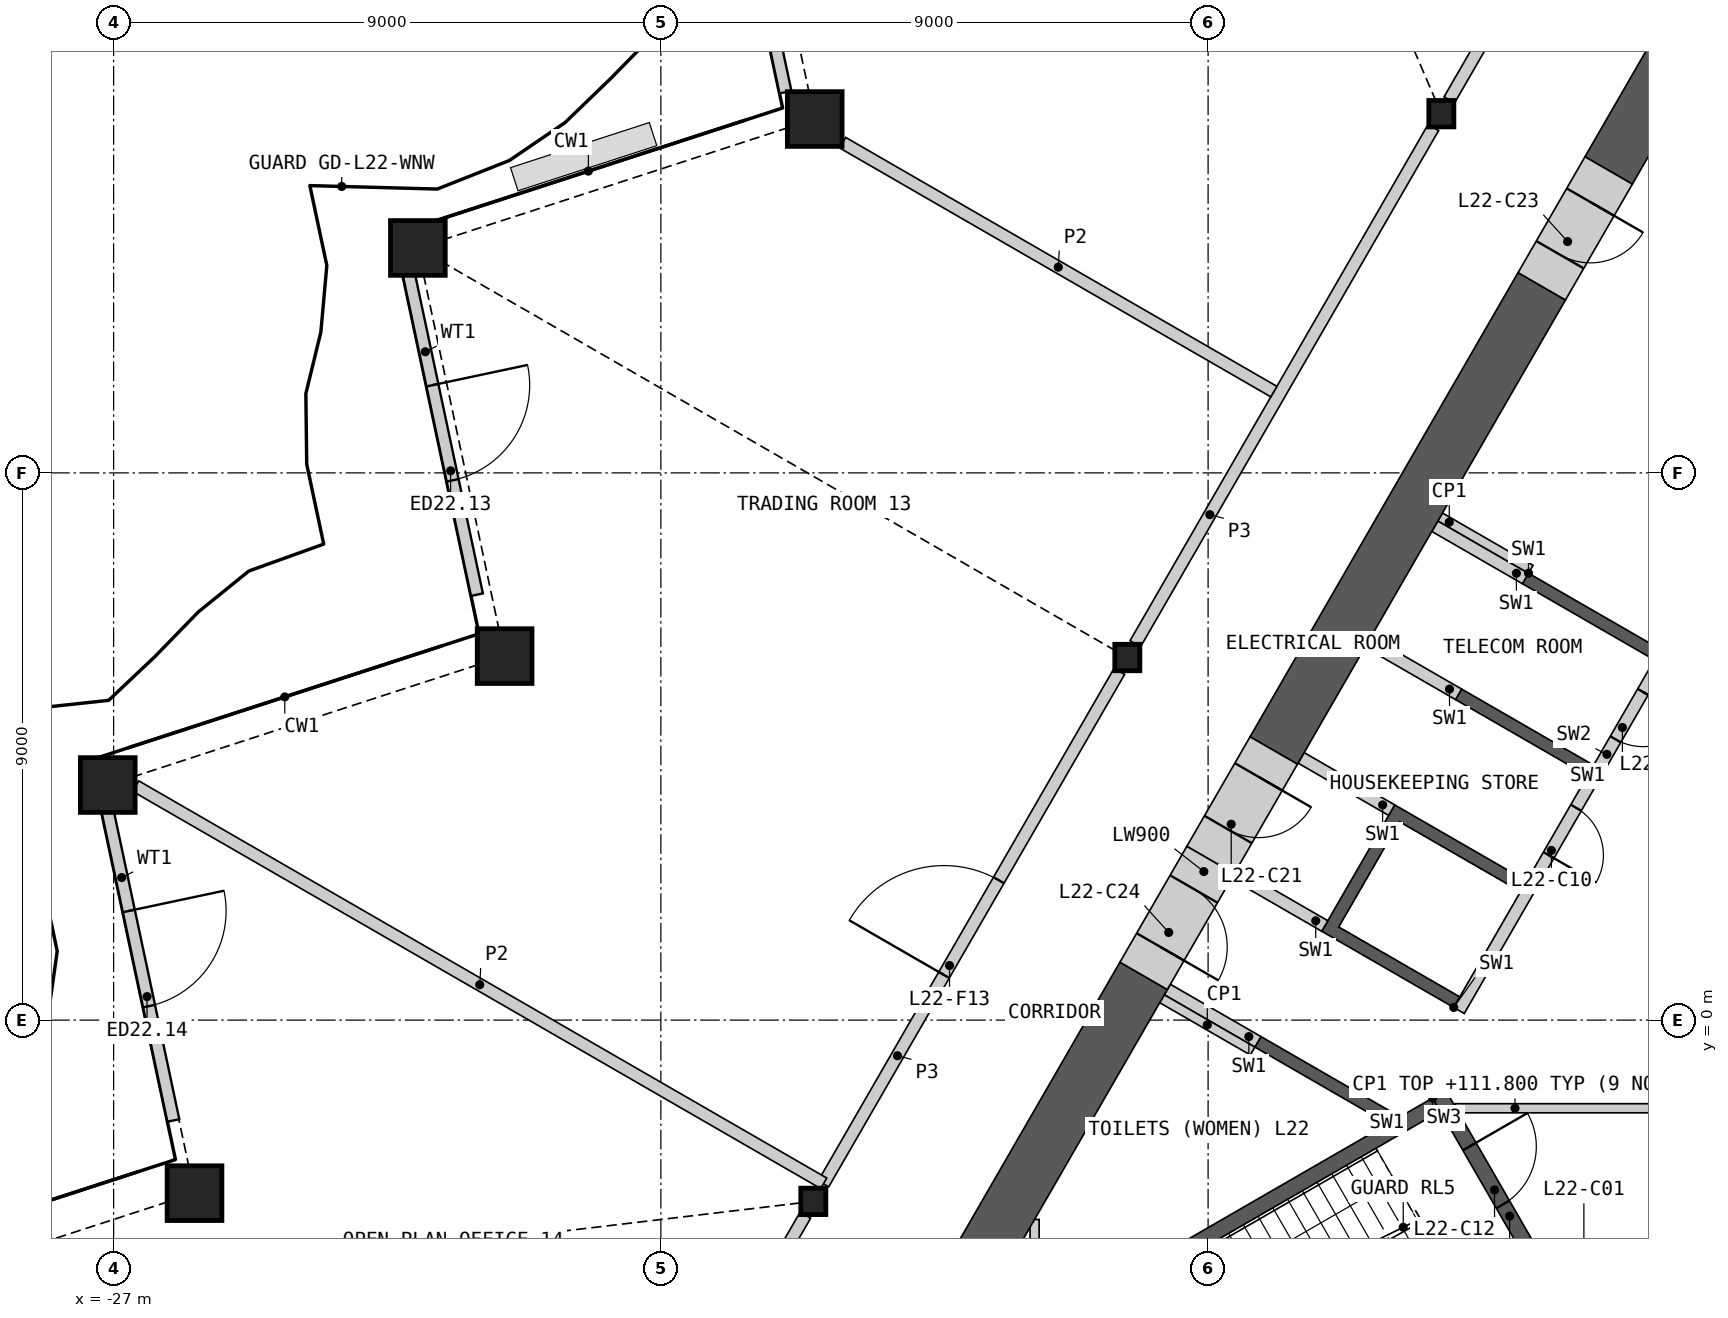
"""IFC4 building model, lengths in metres.
Left out: names, types, materials, properties, quantities, classifications, styles, units other than length and angle.
Written with IfcOpenShell. Run it as: python <this file> out.ifc"""

import sys

from ifc_helpers import new_model, si_unit, direction, frame, frame_2d, origin, origin_2d, place, context, subcontext, project, spatial, polyline, rectangle, hollow_rectangle, i_section, outline, extrude, element, fill, save


model = new_model("IFC4")
c1 = context("Model", 3, precision=1e-05, world=origin(), true_north=direction((0.0, 1.0)))
c2 = subcontext(c1, "Body", "Model", "MODEL_VIEW")
j1 = project(units=[si_unit("LENGTHUNIT", "METRE"), si_unit("PLANEANGLEUNIT", "RADIAN")], contexts=[c1])
p1 = place(None, origin())
s1 = spatial("IfcSite", under=j1, at=p1, CompositionType="ELEMENT")
p2 = place(p1, origin())
s2 = spatial("IfcBuilding", under=s1, at=p2, CompositionType="ELEMENT")
p3 = place(p2, frame((0.0, 0.0, 108.0)))
s3 = spatial("IfcBuildingStorey", under=s2, at=p3, CompositionType="ELEMENT", Elevation=108.0)
for number, where, z_axis, x_axis in (
    (1, (-15.469, 14.82, 0.0), (0.0, 0.0, 1.0), (1.0, 0.0, 0.0)),
    (2, (-21.996, 12.699, 0.0), (0.0, 0.0, 1.0), (1.0, 0.0, 0.0)),
    (3, (-20.57, 5.987, 0.0), (0.0, 0.0, 1.0), (1.0, 0.0, 0.0)),
    (4, (-27.096, 3.866, 0.0), (0.0, 0.0, 1.0), (1.0, 0.0, 0.0)),
    (5, (-25.669, -2.846, 0.0), (0.0, 0.0, 1.0), (1.0, 0.0, 0.0)),
):
    element("IfcColumn", number, at=place(p3, frame(where, z_axis=z_axis, x_axis=x_axis)), inside=s3, PredefinedType="COLUMN", context=c2, shape_type="SweptSolid", body=[
        extrude(hollow_rectangle(XDim=0.9, YDim=0.9, WallThickness=0.06, at=origin_2d()), origin(), (0.0, 0.0, 1.0), 4.2),
    ])
for number, where, z_axis, x_axis in (
    (6, (-5.164, 14.908, 0.0), (0.0, 0.0, 1.0), (1.0, 0.0, 0.0)),
    (7, (-10.328, 5.963, 0.0), (0.0, 0.0, 1.0), (1.0, 0.0, 0.0)),
    (8, (-15.493, -2.982, 0.0), (0.0, 0.0, 1.0), (1.0, 0.0, 0.0)),
):
    element("IfcColumn", number, at=place(p3, frame(where, z_axis=z_axis, x_axis=x_axis)), inside=s3, PredefinedType="COLUMN", context=c2, shape_type="SweptSolid", body=[
        extrude(i_section(OverallWidth=0.412, OverallDepth=0.435, WebThickness=0.036, FlangeThickness=0.057, at=origin_2d()), origin(), (0.0, 0.0, 1.0), 4.2),
    ])
p4 = place(p3, frame((-17.185, 21.066, 0.0), z_axis=(0.0, 0.0, 1.0), x_axis=(0.207930102794, -0.978143686966, 0.0)))
e9 = element("IfcWall", 9, at=p4, inside=s3, PredefinedType="SOLIDWALL", context=c2, shape_type="SweptSolid", body=[
    extrude(rectangle(XDim=5.934, YDim=0.2, at=frame_2d((2.967, 0.0))), origin(), (0.0, 0.0, 1.0), 3.189),
])
p5 = place(p4, frame((2.02, 0.0, 0.0)))
e10 = element("IfcOpeningElement", 10, at=p5, cuts=e9, PredefinedType="OPENING", context=c2, shape_type="SweptSolid", body=[
    extrude(rectangle(XDim=1.6, YDim=2.4, at=frame_2d((0.8, 1.2))), frame((0.0, 0.11, 0.0), z_axis=(0.0, -1.0, 0.0), x_axis=(1.0, 0.0, 0.0)), (0.0, 0.0, 1.0), 0.22),
])
p6 = place(p3, frame((-22.157, 12.324, 0.0), z_axis=(0.0, 0.0, 1.0), x_axis=(0.207903253291, -0.978149394148, 0.0)))
e11 = element("IfcWall", 11, at=p6, inside=s3, PredefinedType="SOLIDWALL", context=c2, shape_type="SweptSolid", body=[
    extrude(rectangle(XDim=5.446, YDim=0.2, at=frame_2d((2.723, 0.0))), origin(), (0.0, 0.0, 1.0), 3.189),
])
p7 = place(p6, frame((1.923, 0.0, 0.0)))
e12 = element("IfcOpeningElement", 12, at=p7, cuts=e11, PredefinedType="OPENING", context=c2, shape_type="SweptSolid", body=[
    extrude(rectangle(XDim=1.6, YDim=2.4, at=frame_2d((0.8, 1.2))), frame((0.0, 0.11, 0.0), z_axis=(0.0, -1.0, 0.0), x_axis=(1.0, 0.0, 0.0)), (0.0, 0.0, 1.0), 0.22),
])
p8 = place(p3, frame((-27.15, 3.676, 0.0), z_axis=(0.0, 0.0, 1.0), x_axis=(0.207912369528, -0.978147456469, 0.0)))
e13 = element("IfcWall", 13, at=p8, inside=s3, PredefinedType="SOLIDWALL", context=c2, shape_type="SweptSolid", body=[
    extrude(rectangle(XDim=5.446, YDim=0.2, at=frame_2d((2.723, 0.0))), origin(), (0.0, 0.0, 1.0), 3.189),
])
p9 = place(p8, frame((1.923, 0.0, 0.0)))
e14 = element("IfcOpeningElement", 14, at=p9, cuts=e13, PredefinedType="OPENING", context=c2, shape_type="SweptSolid", body=[
    extrude(rectangle(XDim=1.6, YDim=2.4, at=frame_2d((0.8, 1.2))), frame((0.0, 0.11, 0.0), z_axis=(0.0, -1.0, 0.0), x_axis=(1.0, 0.0, 0.0)), (0.0, 0.0, 1.0), 0.22),
])
p10 = place(p3, origin())
e15 = element("IfcWall", 15, at=p10, inside=s3, PredefinedType="SHEAR", context=c2, shape_type="SweptSolid", body=[
    extrude(outline(polyline([(-6.061, -1.697), (-8.231, -0.444), (-8.131, -0.271), (-5.96, -1.524), (-6.061, -1.697)])), origin(), (0.0, 0.0, 1.0), 3.8),
])
p11 = place(p3, origin())
e16 = element("IfcWall", 16, at=p11, inside=s3, PredefinedType="SHEAR", context=c2, shape_type="SweptSolid", body=[
    extrude(outline(polyline([(-4.96, 0.208), (-7.131, 1.461), (-5.931, 3.54), (-3.76, 2.287), (-3.861, 2.113), (-5.852, 3.263), (-6.852, 1.531), (-4.861, 0.381), (-4.96, 0.208)])), origin(), (0.0, 0.0, 1.0), 3.8),
])
p12 = place(p3, origin())
e17 = element("IfcWall", 17, at=p12, inside=s3, PredefinedType="SHEAR", context=c2, shape_type="SweptSolid", body=[
    extrude(outline(polyline([(-2.76, 4.019), (-4.931, 5.272), (-4.831, 5.445), (-2.66, 4.192), (-2.76, 4.019)])), origin(), (0.0, 0.0, 1.0), 3.8),
])
p13 = place(p3, origin())
e18 = element("IfcWall", 18, at=p13, inside=s3, PredefinedType="SHEAR", context=c2, shape_type="SweptSolid", body=[
    extrude(outline(polyline([(-3.731, 7.35), (-1.561, 6.097), (-1.66, 5.924), (-3.831, 7.177), (-3.731, 7.35)])), origin(), (0.0, 0.0, 1.0), 3.8),
])
p14 = place(p3, frame((-1.631, 5.776, 0.0), z_axis=(0.0, 0.0, 1.0), x_axis=(-0.499992876559, -0.866029516466, 0.0)))
e19 = element("IfcWall", 19, at=p14, inside=s3, PredefinedType="SOLIDWALL", context=c2, shape_type="SweptSolid", body=[
    extrude(rectangle(XDim=6.486, YDim=0.2, at=frame_2d((3.243, 0.0))), origin(), (0.0, 0.0, 1.0), 3.8),
])
p15 = place(p14, frame((0.437, 0.0, 0.0)))
e20 = element("IfcOpeningElement", 20, at=p15, cuts=e19, PredefinedType="OPENING", context=c2, shape_type="SweptSolid", body=[
    extrude(rectangle(XDim=0.9, YDim=2.1, at=frame_2d((0.45, 1.05))), frame((0.0, 0.11, 0.0), z_axis=(0.0, -1.0, 0.0), x_axis=(1.0, 0.0, 0.0)), (0.0, 0.0, 1.0), 0.22),
])
p16 = place(p14, frame((2.637, 0.0, 0.0)))
e21 = element("IfcOpeningElement", 21, at=p16, cuts=e19, PredefinedType="OPENING", context=c2, shape_type="SweptSolid", body=[
    extrude(rectangle(XDim=0.9, YDim=2.1, at=frame_2d((0.45, 1.05))), frame((0.0, 0.11, 0.0), z_axis=(0.0, -1.0, 0.0), x_axis=(1.0, 0.0, 0.0)), (0.0, 0.0, 1.0), 0.22),
])
for number, where, z_axis, x_axis in (
    (22, (-3.781, 7.263, 0.0), (0.0, 0.0, 1.0), (-0.866, 0.5, 0.0)),
    (23, (-4.881, 5.358, 0.0), (0.0, 0.0, 1.0), (-0.866, 0.5, 0.0)),
):
    element("IfcWall", number, at=place(p3, frame(where, z_axis=z_axis, x_axis=x_axis)), inside=s3, PredefinedType="SHEAR", context=c2, shape_type="SweptSolid", body=[
        extrude(rectangle(XDim=1.72, YDim=0.2, at=frame_2d((0.86, 0.0))), origin(), (0.0, 0.0, 1.0), 3.8),
    ])
p17 = place(p3, frame((-5.981, 3.453, 0.0), z_axis=(0.0, 0.0, 1.0), x_axis=(-0.866060346521, 0.499939472521, 0.0)))
e24 = element("IfcWall", 24, at=p17, inside=s3, PredefinedType="SHEAR", context=c2, shape_type="SweptSolid", body=[
    extrude(rectangle(XDim=1.72, YDim=0.2, at=frame_2d((0.86, 0.0))), origin(), (0.0, 0.0, 1.0), 3.8),
])
for number, where, z_axis, x_axis in (
    (25, (-7.081, 1.548, 0.0), (0.0, 0.0, 1.0), (-0.866, 0.5, 0.0)),
    (26, (-8.181, -0.357, 0.0), (0.0, 0.0, 1.0), (-0.866, 0.5, 0.0)),
):
    element("IfcWall", number, at=place(p3, frame(where, z_axis=z_axis, x_axis=x_axis)), inside=s3, PredefinedType="SHEAR", context=c2, shape_type="SweptSolid", body=[
        extrude(rectangle(XDim=1.72, YDim=0.2, at=frame_2d((0.86, 0.0))), origin(), (0.0, 0.0, 1.0), 3.8),
    ])
p18 = place(p3, frame((-4.941, -1.45, 0.0), z_axis=(0.0, 0.0, 1.0), x_axis=(1.0, 0.0, 0.0)))
e27 = element("IfcWall", 27, at=p18, inside=s3, PredefinedType="PARTITIONING", context=c2, shape_type="SweptSolid", body=[
    extrude(rectangle(XDim=9.882, YDim=0.15, at=frame_2d((4.941, 0.0))), origin(), (0.0, 0.0, 1.0), 3.8),
])
p19 = place(p18, frame((4.391, 0.0, 0.0)))
e28 = element("IfcOpeningElement", 28, at=p19, cuts=e27, PredefinedType="OPENING", context=c2, shape_type="SweptSolid", body=[
    extrude(rectangle(XDim=1.1, YDim=2.1, at=frame_2d((0.55, 1.05))), frame((0.0, 0.085, 0.0), z_axis=(0.0, -1.0, 0.0), x_axis=(1.0, 0.0, 0.0)), (0.0, 0.0, 1.0), 0.17),
])
p20 = place(p3, origin())
e29 = element("IfcWall", 29, at=p20, inside=s3, PredefinedType="SHEAR", context=c2, shape_type="SweptSolid", body=[
    extrude(outline(polyline([(-5.307, -1.281), (-10.374, -4.206), (-10.032, -4.298), (-5.182, -1.498), (-5.307, -1.281)])), origin(), (0.0, 0.0, 1.0), 3.8),
])
p21 = place(p3, frame((-5.199, -1.219, 0.0), z_axis=(0.0, 0.0, 1.0), x_axis=(0.499982516597, -0.866035497597, 0.0)))
e30 = element("IfcWall", 30, at=p21, inside=s3, PredefinedType="SHEAR", context=c2, shape_type="SweptSolid", body=[
    extrude(rectangle(XDim=3.088, YDim=0.25, at=frame_2d((1.544, 0.0))), origin(), (0.0, 0.0, 1.0), 3.8),
])
p22 = place(p21, frame((0.994, 0.0, 0.0)))
e31 = element("IfcOpeningElement", 31, at=p22, cuts=e30, PredefinedType="OPENING", context=c2, shape_type="SweptSolid", body=[
    extrude(rectangle(XDim=1.1, YDim=2.1, at=frame_2d((0.55, 1.05))), frame((0.0, 0.135, 0.0), z_axis=(0.0, -1.0, 0.0), x_axis=(1.0, 0.0, 0.0)), (0.0, 0.0, 1.0), 0.27),
])
for number, where, z_axis, x_axis in (
    (32, (-8.268, -0.509, 0.0), (0.0, 0.0, 1.0), (-0.866, 0.5, 0.0)),
    (33, (-3.693, 7.415, 0.0), (0.0, 0.0, 1.0), (-0.866, 0.5, 0.0)),
):
    element("IfcWall", number, at=place(p3, frame(where, z_axis=z_axis, x_axis=x_axis)), inside=s3, PredefinedType="PARTITIONING", context=c2, shape_type="SweptSolid", body=[
        extrude(rectangle(XDim=1.72, YDim=0.15, at=frame_2d((0.86, 0.0))), origin(), (0.0, 0.0, 1.0), 3.8),
    ])
p23 = place(p3, frame((-11.854, -8.626, 0.0), z_axis=(0.0, 0.0, 1.0), x_axis=(0.0, 1.0, 0.0)))
e34 = element("IfcWall", 34, at=p23, inside=s3, PredefinedType="PARTITIONING", context=c2, shape_type="SweptSolid", body=[
    extrude(rectangle(XDim=5.347, YDim=0.15, at=frame_2d((2.674, 0.0))), origin(), (0.0, 0.0, 1.0), 3.8),
])
p24 = place(p3, frame((-3.512, 12.069, 0.0), z_axis=(0.0, 0.0, 1.0), x_axis=(-0.500002126466, -0.866024176065, 0.0)))
e35 = element("IfcWall", 35, at=p24, inside=s3, PredefinedType="SHEAR", context=c2, shape_type="SweptSolid", body=[
    extrude(rectangle(XDim=8.816, YDim=0.9, at=frame_2d((4.408, 0.0))), origin(), (0.0, 0.0, 1.0), 3.8),
])
p25 = place(p3, frame((-10.06, 0.728, 0.0), z_axis=(0.0, 0.0, 1.0), x_axis=(-0.500002975332, -0.866023685969, 0.0)))
e36 = element("IfcWall", 36, at=p25, inside=s3, PredefinedType="SHEAR", context=c2, shape_type="SweptSolid", body=[
    extrude(rectangle(XDim=6.429, YDim=0.9, at=frame_2d((3.214, 0.0))), origin(), (0.0, 0.0, 1.0), 3.8),
])
p26 = place(p3, frame((-0.39, 17.478, 0.0), z_axis=(0.0, 0.0, 1.0), x_axis=(-0.500046330384, -0.865998653272, 0.0)))
e37 = element("IfcWall", 37, at=p26, inside=s3, PredefinedType="SHEAR", context=c2, shape_type="SweptSolid", body=[
    extrude(rectangle(XDim=4.045, YDim=0.9, at=frame_2d((2.023, 0.0))), origin(), (0.0, 0.0, 1.0), 3.8),
])
p27 = place(p3, frame((-7.92, 4.434, 0.0), z_axis=(0.0, 0.0, 1.0), x_axis=(-0.499939227269, -0.866060488094, 0.0)))
e38 = element("IfcWall", 38, at=p27, inside=s3, PredefinedType="SHEAR", context=c2, shape_type="SweptSolid", body=[
    extrude(rectangle(XDim=2.08, YDim=0.9, at=frame_2d((1.04, 0.0))), origin(), (0.0, 0.0, 1.0), 3.8),
])
p28 = place(p27, frame((0.5, 0.0, 0.0)))
e39 = element("IfcOpeningElement", 39, at=p28, cuts=e38, PredefinedType="OPENING", context=c2, shape_type="SweptSolid", body=[
    extrude(rectangle(XDim=1.0, YDim=2.1, at=frame_2d((0.5, 1.05))), frame((0.0, 0.46, 0.0), z_axis=(0.0, -1.0, 0.0), x_axis=(1.0, 0.0, 0.0)), (0.0, 0.0, 1.0), 0.92),
])
p29 = place(p3, frame((-2.413, 13.974, 0.0), z_axis=(0.0, 0.0, 1.0), x_axis=(-0.499946605688, -0.86605622881, 0.0)))
e40 = element("IfcWall", 40, at=p29, inside=s3, PredefinedType="SHEAR", context=c2, shape_type="SweptSolid", body=[
    extrude(rectangle(XDim=2.2, YDim=0.9, at=frame_2d((1.1, 0.0))), origin(), (0.0, 0.0, 1.0), 3.8),
])
p30 = place(p29, frame((0.6, 0.0, 0.0)))
e41 = element("IfcOpeningElement", 41, at=p30, cuts=e40, PredefinedType="OPENING", context=c2, shape_type="SweptSolid", body=[
    extrude(rectangle(XDim=1.0, YDim=2.1, at=frame_2d((0.5, 1.05))), frame((0.0, 0.46, 0.0), z_axis=(0.0, -1.0, 0.0), x_axis=(1.0, 0.0, 0.0)), (0.0, 0.0, 1.0), 0.92),
])
p31 = place(p3, frame((-8.96, 2.633, 0.0), z_axis=(0.0, 0.0, 1.0), x_axis=(-0.50002983664, -0.866008176907, 0.0)))
e42 = element("IfcWall", 42, at=p31, inside=s3, PredefinedType="SHEAR", context=c2, shape_type="SweptSolid", body=[
    extrude(rectangle(XDim=2.2, YDim=0.9, at=frame_2d((1.1, 0.0))), origin(), (0.0, 0.0, 1.0), 3.8),
])
p32 = place(p31, frame((0.55, 0.0, 0.0)))
e43 = element("IfcOpeningElement", 43, at=p32, cuts=e42, PredefinedType="OPENING", context=c2, shape_type="SweptSolid", body=[
    extrude(rectangle(XDim=1.1, YDim=2.1, at=frame_2d((0.55, 1.05))), frame((0.0, 0.46, 0.0), z_axis=(0.0, -1.0, 0.0), x_axis=(1.0, 0.0, 0.0)), (0.0, 0.0, 1.0), 0.92),
])
p33 = place(p3, frame((-10.197, 6.19, 0.0), z_axis=(0.0, 0.0, 1.0), x_axis=(0.500012035596, 0.866018454918, 0.0)))
e44 = element("IfcWall", 44, at=p33, inside=s3, PredefinedType="PARTITIONING", context=c2, shape_type="SweptSolid", body=[
    extrude(rectangle(XDim=9.803, YDim=0.2, at=frame_2d((4.902, 0.0))), origin(), (0.0, 0.0, 1.0), 3.8),
])
p34 = place(p3, frame((-15.326, -2.693, 0.0), z_axis=(0.0, 0.0, 1.0), x_axis=(0.500010522431, 0.866019328571, 0.0)))
e45 = element("IfcWall", 45, at=p34, inside=s3, PredefinedType="PARTITIONING", context=c2, shape_type="SweptSolid", body=[
    extrude(rectangle(XDim=9.733, YDim=0.2, at=frame_2d((4.866, 0.0))), origin(), (0.0, 0.0, 1.0), 3.8),
])
p35 = place(p34, frame((3.966, 0.0, 0.0)))
e46 = element("IfcOpeningElement", 46, at=p35, cuts=e45, PredefinedType="OPENING", context=c2, shape_type="SweptSolid", body=[
    extrude(rectangle(XDim=1.8, YDim=2.1, at=frame_2d((0.9, 1.05))), frame((0.0, 0.11, 0.0), z_axis=(0.0, -1.0, 0.0), x_axis=(1.0, 0.0, 0.0)), (0.0, 0.0, 1.0), 0.22),
])
p36 = place(p3, frame((-5.033, 15.135, 0.0), z_axis=(0.0, 0.0, 1.0), x_axis=(0.499980978912, 0.866036385336, 0.0)))
e47 = element("IfcWall", 47, at=p36, inside=s3, PredefinedType="PARTITIONING", context=c2, shape_type="SweptSolid", body=[
    extrude(rectangle(XDim=6.24, YDim=0.2, at=frame_2d((3.12, 0.0))), origin(), (0.0, 0.0, 1.0), 3.8),
])
p37 = place(p36, frame((2.169, 0.0, 0.0)))
e48 = element("IfcOpeningElement", 48, at=p37, cuts=e47, PredefinedType="OPENING", context=c2, shape_type="SweptSolid", body=[
    extrude(rectangle(XDim=1.8, YDim=2.1, at=frame_2d((0.9, 1.05))), frame((0.0, 0.11, 0.0), z_axis=(0.0, -1.0, 0.0), x_axis=(1.0, 0.0, 0.0)), (0.0, 0.0, 1.0), 0.22),
])
p38 = place(p3, frame((-18.744, -8.613, 0.0), z_axis=(0.0, 0.0, 1.0), x_axis=(0.499997920671, 0.866026604282, 0.0)))
e49 = element("IfcWall", 49, at=p38, inside=s3, PredefinedType="PARTITIONING", context=c2, shape_type="SweptSolid", body=[
    extrude(rectangle(XDim=6.24, YDim=0.2, at=frame_2d((3.12, 0.0))), origin(), (0.0, 0.0, 1.0), 3.8),
])
p39 = place(p38, frame((2.67, 0.0, 0.0)))
e50 = element("IfcOpeningElement", 50, at=p39, cuts=e49, PredefinedType="OPENING", context=c2, shape_type="SweptSolid", body=[
    extrude(rectangle(XDim=1.0, YDim=2.1, at=frame_2d((0.5, 1.05))), frame((0.0, 0.11, 0.0), z_axis=(0.0, -1.0, 0.0), x_axis=(1.0, 0.0, 0.0)), (0.0, 0.0, 1.0), 0.22),
])
p40 = place(p3, frame((-26.636, 3.848, 0.0), z_axis=(0.0, 0.0, 1.0), x_axis=(0.866029068465, -0.499993652534, 0.0)))
e51 = element("IfcWall", 51, at=p40, inside=s3, PredefinedType="PARTITIONING", context=c2, shape_type="SweptSolid", body=[
    extrude(rectangle(XDim=13.066, YDim=0.2, at=frame_2d((6.533, 0.0))), origin(), (0.0, 0.0, 1.0), 2.885),
])
p41 = place(p3, frame((-15.01, 14.431, 0.0), z_axis=(0.0, 0.0, 1.0), x_axis=(0.866019738461, -0.5000098125, 0.0)))
e52 = element("IfcWall", 52, at=p41, inside=s3, PredefinedType="PARTITIONING", context=c2, shape_type="SweptSolid", body=[
    extrude(rectangle(XDim=8.188, YDim=0.2, at=frame_2d((4.094, 0.0))), origin(), (0.0, 0.0, 1.0), 2.885),
])
p42 = place(p7, origin())
e53 = element("IfcDoor", 53, at=p42, inside=s3, OperationType="DOUBLE_DOOR_SINGLE_SWING", PredefinedType="DOOR", context=c2, shape_type="SweptSolid", body=[
    extrude(rectangle(XDim=1.6, YDim=2.4, at=frame_2d((0.8, 1.2))), frame((0.0, 0.025, 0.0), z_axis=(0.0, -1.0, 0.0), x_axis=(1.0, 0.0, 0.0)), (0.0, 0.0, 1.0), 0.05),
])
fill(e12, e53)
p43 = place(p9, origin())
e54 = element("IfcDoor", 54, at=p43, inside=s3, OperationType="DOUBLE_DOOR_SINGLE_SWING", PredefinedType="DOOR", context=c2, shape_type="SweptSolid", body=[
    extrude(rectangle(XDim=1.6, YDim=2.4, at=frame_2d((0.8, 1.2))), frame((0.0, 0.025, 0.0), z_axis=(0.0, -1.0, 0.0), x_axis=(1.0, 0.0, 0.0)), (0.0, 0.0, 1.0), 0.05),
])
fill(e14, e54)
p44 = place(p15, origin())
e55 = element("IfcDoor", 55, at=p44, inside=s3, OperationType="SINGLE_SWING_LEFT", PredefinedType="DOOR", context=c2, shape_type="SweptSolid", body=[
    extrude(rectangle(XDim=0.9, YDim=2.1, at=frame_2d((0.45, 1.05))), frame((0.0, 0.025, 0.0), z_axis=(0.0, -1.0, 0.0), x_axis=(1.0, 0.0, 0.0)), (0.0, 0.0, 1.0), 0.05),
])
fill(e20, e55)
p45 = place(p16, origin())
e56 = element("IfcDoor", 56, at=p45, inside=s3, OperationType="SINGLE_SWING_RIGHT", PredefinedType="DOOR", context=c2, shape_type="SweptSolid", body=[
    extrude(rectangle(XDim=0.9, YDim=2.1, at=frame_2d((0.45, 1.05))), frame((0.0, 0.025, 0.0), z_axis=(0.0, -1.0, 0.0), x_axis=(1.0, 0.0, 0.0)), (0.0, 0.0, 1.0), 0.05),
])
fill(e21, e56)
p46 = place(p22, origin())
e57 = element("IfcDoor", 57, at=p46, inside=s3, OperationType="SINGLE_SWING_LEFT", PredefinedType="DOOR", context=c2, shape_type="SweptSolid", body=[
    extrude(rectangle(XDim=1.1, YDim=2.1, at=frame_2d((0.55, 1.05))), frame((0.0, 0.025, 0.0), z_axis=(0.0, -1.0, 0.0), x_axis=(1.0, 0.0, 0.0)), (0.0, 0.0, 1.0), 0.05),
])
fill(e31, e57)
p47 = place(p28, origin())
e58 = element("IfcDoor", 58, at=p47, inside=s3, OperationType="SINGLE_SWING_LEFT", PredefinedType="DOOR", context=c2, shape_type="SweptSolid", body=[
    extrude(rectangle(XDim=1.0, YDim=2.1, at=frame_2d((0.5, 1.05))), frame((0.0, 0.205, 0.0), z_axis=(0.0, -1.0, 0.0), x_axis=(1.0, 0.0, 0.0)), (0.0, 0.0, 1.0), 0.05),
])
fill(e39, e58)
p48 = place(p30, origin())
e59 = element("IfcDoor", 59, at=p48, inside=s3, OperationType="SINGLE_SWING_LEFT", PredefinedType="DOOR", context=c2, shape_type="SweptSolid", body=[
    extrude(rectangle(XDim=1.0, YDim=2.1, at=frame_2d((0.5, 1.05))), frame((0.0, 0.205, 0.0), z_axis=(0.0, -1.0, 0.0), x_axis=(1.0, 0.0, 0.0)), (0.0, 0.0, 1.0), 0.05),
])
fill(e41, e59)
p49 = place(p32, origin())
e60 = element("IfcDoor", 60, at=p49, inside=s3, OperationType="SINGLE_SWING_RIGHT", PredefinedType="DOOR", context=c2, shape_type="SweptSolid", body=[
    extrude(rectangle(XDim=1.1, YDim=2.1, at=frame_2d((0.55, 1.05))), frame((0.0, 0.205, 0.0), z_axis=(0.0, -1.0, 0.0), x_axis=(1.0, 0.0, 0.0)), (0.0, 0.0, 1.0), 0.05),
])
fill(e43, e60)
p50 = place(p35, origin())
e61 = element("IfcDoor", 61, at=p50, inside=s3, OperationType="DOUBLE_DOOR_SINGLE_SWING", PredefinedType="DOOR", context=c2, shape_type="SweptSolid", body=[
    extrude(rectangle(XDim=1.8, YDim=2.1, at=frame_2d((0.9, 1.05))), frame((0.0, 0.025, 0.0), z_axis=(0.0, -1.0, 0.0), x_axis=(1.0, 0.0, 0.0)), (0.0, 0.0, 1.0), 0.05),
])
fill(e46, e61)
save(model, sys.argv[1])
